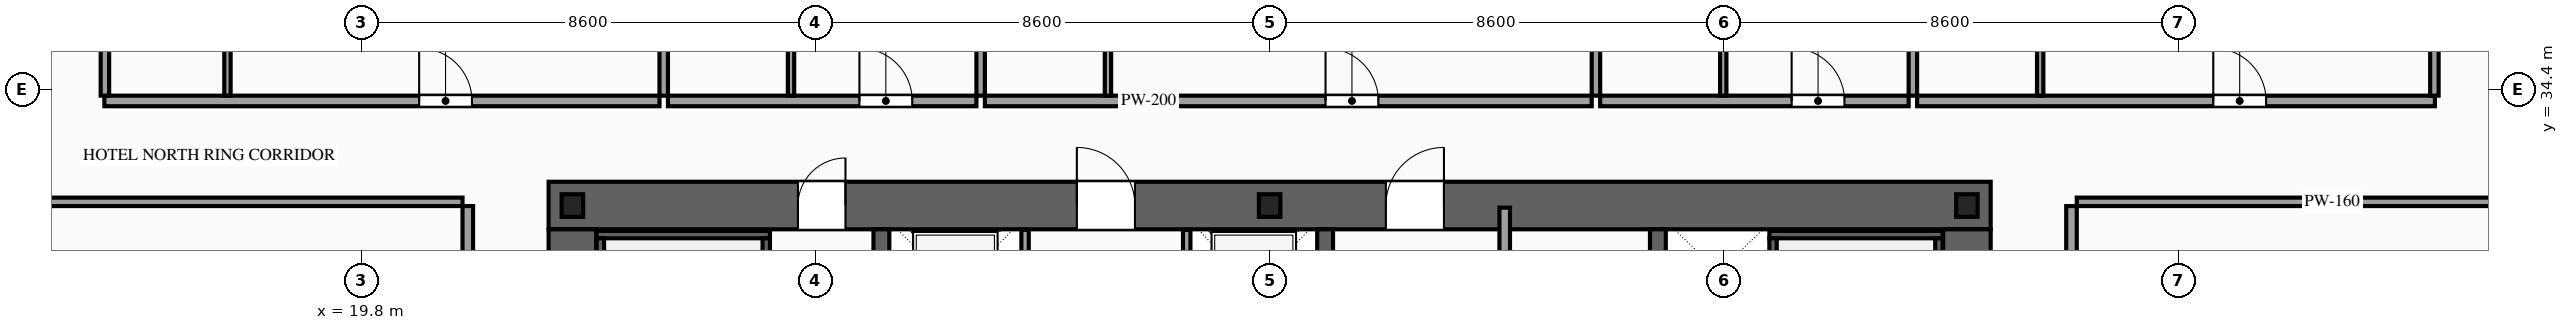
"""IFC4 building model, lengths in metres.
Left out: names, types, materials, properties, quantities, classifications, styles, units other than length and angle.
Written with IfcOpenShell. Run it as: python <this file> out.ifc"""

import sys

from ifc_helpers import new_model, si_unit, direction, frame, frame_2d, origin, origin_2d, place, context, subcontext, project, spatial, rectangle, i_section, extrude, source, transform, mapped, element, fill, save


model = new_model("IFC4")
c1 = context("Model", 3, precision=1e-05, world=origin(), true_north=direction((0.0, 1.0)))
c2 = subcontext(c1, "Body", "Model", "MODEL_VIEW")
j1 = project(units=[si_unit("LENGTHUNIT", "METRE"), si_unit("PLANEANGLEUNIT", "RADIAN")], contexts=[c1])
p1 = place(None, origin())
s1 = spatial("IfcSite", under=j1, at=p1, CompositionType="ELEMENT")
p2 = place(p1, origin())
s2 = spatial("IfcBuilding", under=s1, at=p2, CompositionType="ELEMENT")
p3 = place(p2, frame((0.0, 0.0, 78.4)))
s3 = spatial("IfcBuildingStorey", under=s2, at=p3, CompositionType="ELEMENT", Elevation=78.4)
p4 = place(p3, frame((23.35, 32.2, 0.0), z_axis=(0.0, 0.0, 1.0), x_axis=(1.0, 0.0, 0.0)))
e1 = element("IfcWall", 1, at=p4, inside=s3, PredefinedType="SHEAR", context=c2, shape_type="SweptSolid", body=[
    extrude(rectangle(XDim=27.3, YDim=0.9, at=frame_2d((13.65, 0.0))), origin(), (0.0, 0.0, 1.0), 3.6),
])
p5 = place(p4, frame((4.72, 0.0, 0.0)))
e2 = element("IfcOpeningElement", 2, at=p5, cuts=e1, PredefinedType="OPENING", context=c2, shape_type="SweptSolid", body=[
    extrude(rectangle(XDim=0.9, YDim=2.15, at=frame_2d((0.45, 1.075))), frame((0.0, 0.465, 0.0), z_axis=(0.0, -1.0, 0.0), x_axis=(1.0, 0.0, 0.0)), (0.0, 0.0, 1.0), 0.93),
])
p6 = place(p4, frame((10.0, 0.0, 0.0)))
e3 = element("IfcOpeningElement", 3, at=p6, cuts=e1, PredefinedType="OPENING", context=c2, shape_type="SweptSolid", body=[
    extrude(rectangle(XDim=1.1, YDim=2.2, at=frame_2d((0.55, 1.1))), frame((0.0, 0.465, 0.0), z_axis=(0.0, -1.0, 0.0), x_axis=(1.0, 0.0, 0.0)), (0.0, 0.0, 1.0), 0.93),
])
p7 = place(p4, frame((15.85, 0.0, 0.0)))
e4 = element("IfcOpeningElement", 4, at=p7, cuts=e1, PredefinedType="OPENING", context=c2, shape_type="SweptSolid", body=[
    extrude(rectangle(XDim=1.1, YDim=2.2, at=frame_2d((0.55, 1.1))), frame((0.0, 0.465, 0.0), z_axis=(0.0, -1.0, 0.0), x_axis=(1.0, 0.0, 0.0)), (0.0, 0.0, 1.0), 0.93),
])
m1 = source(origin(), c2, "Body", "SweptSolid", [
    extrude(rectangle(XDim=11.9, YDim=0.9, at=frame_2d((5.95, 0.0))), origin(), (0.0, 0.0, 1.0), 3.6),
])
for number, where, z_axis, x_axis in (
    (5, (23.8, 19.85, 0.0), (0.0, 0.0, 1.0), (0.0, 1.0, 0.0)),
    (6, (50.2, 19.85, 0.0), (0.0, 0.0, 1.0), (0.0, 1.0, 0.0)),
):
    element("IfcWall", number, at=place(p3, frame(where, z_axis=z_axis, x_axis=x_axis)), inside=s3, PredefinedType="SHEAR", context=c2, shape_type="MappedRepresentation", body=[
        mapped(m1, transform((0.0, 0.0, 0.0), scale=1.0)),
    ])
m2 = source(origin(), c2, "Body", "SweptSolid", [
    extrude(rectangle(XDim=11.9, YDim=0.3, at=frame_2d((5.95, 0.0))), origin(), (0.0, 0.0, 1.0), 3.6),
])
for number, where, z_axis, x_axis in (
    (7, (29.65, 19.85, 0.0), (0.0, 0.0, 1.0), (0.0, 1.0, 0.0)),
    (8, (38.05, 19.85, 0.0), (0.0, 0.0, 1.0), (0.0, 1.0, 0.0)),
    (9, (44.35, 19.85, 0.0), (0.0, 0.0, 1.0), (0.0, 1.0, 0.0)),
):
    element("IfcWall", number, at=place(p3, frame(where, z_axis=z_axis, x_axis=x_axis)), inside=s3, PredefinedType="SOLIDWALL", context=c2, shape_type="MappedRepresentation", body=[
        mapped(m2, transform((0.0, 0.0, 0.0), scale=1.0)),
    ])
m3 = source(origin(), c2, "Body", "SweptSolid", [
    extrude(i_section(OverallWidth=0.407, OverallDepth=0.428, WebThickness=0.02, FlangeThickness=0.035, at=origin_2d()), origin(), (0.0, 0.0, 1.0), 3.6),
])
for number, where, z_axis, x_axis in (
    (10, (23.8, 32.2, 0.0), (0.0, 0.0, 1.0), (1.0, 0.0, 0.0)),
    (11, (37.0, 32.2, 0.0), (0.0, 0.0, 1.0), (1.0, 0.0, 0.0)),
    (12, (50.2, 32.2, 0.0), (0.0, 0.0, 1.0), (1.0, 0.0, 0.0)),
):
    element("IfcColumn", number, at=place(p3, frame(where, z_axis=z_axis, x_axis=x_axis)), inside=s3, PredefinedType="COLUMN", context=c2, shape_type="MappedRepresentation", body=[
        mapped(m3, transform((0.0, 0.0, 0.0), scale=1.0)),
    ])
p8 = place(p3, frame((32.37, 29.4, 0.0), z_axis=(0.0, 0.0, 1.0), x_axis=(0.0, 1.0, 0.0)))
e13 = element("IfcWall", 13, at=p8, inside=s3, PredefinedType="SOLIDWALL", context=c2, shape_type="SweptSolid", body=[
    extrude(rectangle(XDim=2.34, YDim=0.14, at=frame_2d((1.17, 0.0))), origin(), (0.0, 0.0, 1.0), 3.38),
])
p9 = place(p8, frame((0.62, 0.0, 0.0)))
e14 = element("IfcOpeningElement", 14, at=p9, cuts=e13, PredefinedType="OPENING", context=c2, shape_type="SweptSolid", body=[
    extrude(rectangle(XDim=1.1, YDim=2.2, at=frame_2d((0.55, 1.1))), frame((0.0, 0.085, 0.0), z_axis=(0.0, -1.0, 0.0), x_axis=(1.0, 0.0, 0.0)), (0.0, 0.0, 1.0), 0.17),
])
p10 = place(p3, frame((35.43, 29.4, 0.0), z_axis=(0.0, 0.0, 1.0), x_axis=(0.0, 1.0, 0.0)))
e15 = element("IfcWall", 15, at=p10, inside=s3, PredefinedType="SOLIDWALL", context=c2, shape_type="SweptSolid", body=[
    extrude(rectangle(XDim=2.34, YDim=0.14, at=frame_2d((1.17, 0.0))), origin(), (0.0, 0.0, 1.0), 3.38),
])
p11 = place(p10, frame((0.62, 0.0, 0.0)))
e16 = element("IfcOpeningElement", 16, at=p11, cuts=e15, PredefinedType="OPENING", context=c2, shape_type="SweptSolid", body=[
    extrude(rectangle(XDim=1.1, YDim=2.2, at=frame_2d((0.55, 1.1))), frame((0.0, 0.085, 0.0), z_axis=(0.0, -1.0, 0.0), x_axis=(1.0, 0.0, 0.0)), (0.0, 0.0, 1.0), 0.17),
])
m4 = source(origin(), c2, "Body", "SweptSolid", [
    extrude(rectangle(XDim=3.28, YDim=0.14, at=frame_2d((1.64, 0.0))), origin(), (0.0, 0.0, 1.0), 3.38),
])
p12 = place(p3, frame((24.26, 31.65, 0.0), z_axis=(0.0, 0.0, 1.0), x_axis=(1.0, 0.0, 0.0)))
e17 = element("IfcWall", 17, at=p12, inside=s3, PredefinedType="SOLIDWALL", context=c2, shape_type="MappedRepresentation", body=[
    mapped(m4, transform((0.0, 0.0, 0.0), scale=1.0)),
])
m5 = source(origin(), c2, "Body", "SweptSolid", [
    extrude(rectangle(XDim=8.94, YDim=0.14, at=frame_2d((4.47, 0.0))), origin(), (0.0, 0.0, 1.0), 3.38),
])
for number, where, z_axis, x_axis in (
    (18, (24.33, 22.64, 0.0), (0.0, 0.0, 1.0), (0.0, 1.0, 0.0)),
    (19, (27.47, 22.64, 0.0), (0.0, 0.0, 1.0), (0.0, 1.0, 0.0)),
):
    element("IfcWall", number, at=place(p3, frame(where, z_axis=z_axis, x_axis=x_axis)), inside=s3, PredefinedType="SOLIDWALL", context=c2, shape_type="MappedRepresentation", body=[
        mapped(m5, transform((0.0, 0.0, 0.0), scale=1.0)),
    ])
p13 = place(p3, frame((46.46, 31.65, 0.0), z_axis=(0.0, 0.0, 1.0), x_axis=(1.0, 0.0, 0.0)))
e20 = element("IfcWall", 20, at=p13, inside=s3, PredefinedType="SOLIDWALL", context=c2, shape_type="MappedRepresentation", body=[
    mapped(m4, transform((0.0, 0.0, 0.0), scale=1.0)),
])
for number, where, z_axis, x_axis in (
    (21, (46.53, 22.64, 0.0), (0.0, 0.0, 1.0), (0.0, 1.0, 0.0)),
    (22, (49.67, 22.64, 0.0), (0.0, 0.0, 1.0), (0.0, 1.0, 0.0)),
):
    element("IfcWall", number, at=place(p3, frame(where, z_axis=z_axis, x_axis=x_axis)), inside=s3, PredefinedType="SOLIDWALL", context=c2, shape_type="MappedRepresentation", body=[
        mapped(m5, transform((0.0, 0.0, 0.0), scale=1.0)),
    ])
m6 = source(origin(), c2, "Body", "SweptSolid", [
    extrude(rectangle(XDim=12.72, YDim=0.2, at=frame_2d((6.36, 0.0))), origin(), (0.0, 0.0, 1.0), 3.38),
])
p14 = place(p3, frame((41.45, 19.44, 0.0), z_axis=(0.0, 0.0, 1.0), x_axis=(0.0, 1.0, 0.0)))
e23 = element("IfcWall", 23, at=p14, inside=s3, PredefinedType="PARTITIONING", context=c2, shape_type="MappedRepresentation", body=[
    mapped(m6, transform((0.0, 0.0, 0.0), scale=1.0)),
])
p15 = place(p3, frame((14.94, 34.18, 0.0), z_axis=(0.0, 0.0, 1.0), x_axis=(1.0, 0.0, 0.0)))
e24 = element("IfcWall", 24, at=p15, inside=s3, PredefinedType="PARTITIONING", context=c2, shape_type="SweptSolid", body=[
    extrude(rectangle(XDim=10.509, YDim=0.2, at=frame_2d((5.254, 0.0))), origin(), (0.0, 0.0, 1.0), 3.38),
])
p16 = place(p15, frame((5.959, 0.0, 0.0)))
e25 = element("IfcOpeningElement", 25, at=p16, cuts=e24, PredefinedType="OPENING", context=c2, shape_type="SweptSolid", body=[
    extrude(rectangle(XDim=1.0, YDim=2.2, at=frame_2d((0.5, 1.1))), frame((0.0, 0.115, 0.0), z_axis=(0.0, -1.0, 0.0), x_axis=(1.0, 0.0, 0.0)), (0.0, 0.0, 1.0), 0.23),
])
m7 = source(origin(), c2, "Body", "SweptSolid", [
    extrude(rectangle(XDim=16.47, YDim=0.16, at=frame_2d((8.235, 0.0))), origin(), (0.0, 0.0, 1.0), 3.38),
])
p17 = place(p3, frame((25.529, 34.28, 0.0), z_axis=(0.0, 0.0, 1.0), x_axis=(0.0, 1.0, 0.0)))
e26 = element("IfcWall", 26, at=p17, inside=s3, PredefinedType="PARTITIONING", context=c2, shape_type="MappedRepresentation", body=[
    mapped(m7, transform((0.0, 0.0, 0.0), scale=1.0)),
])
m8 = source(origin(), c2, "Body", "SweptSolid", [
    extrude(rectangle(XDim=2.42, YDim=0.12, at=frame_2d((1.21, 0.0))), origin(), (0.0, 0.0, 1.0), 3.38),
])
p18 = place(p3, frame((17.27, 34.28, 0.0), z_axis=(0.0, 0.0, 1.0), x_axis=(0.0, 1.0, 0.0)))
e27 = element("IfcWall", 27, at=p18, inside=s3, PredefinedType="PARTITIONING", context=c2, shape_type="MappedRepresentation", body=[
    mapped(m8, transform((0.0, 0.0, 0.0), scale=1.0)),
])
p19 = place(p3, frame((25.609, 34.18, 0.0), z_axis=(0.0, 0.0, 1.0), x_axis=(1.0, 0.0, 0.0)))
e28 = element("IfcWall", 28, at=p19, inside=s3, PredefinedType="PARTITIONING", context=c2, shape_type="SweptSolid", body=[
    extrude(rectangle(XDim=5.84, YDim=0.2, at=frame_2d((2.92, 0.0))), origin(), (0.0, 0.0, 1.0), 3.38),
])
p20 = place(p19, frame((3.625, 0.0, 0.0)))
e29 = element("IfcOpeningElement", 29, at=p20, cuts=e28, PredefinedType="OPENING", context=c2, shape_type="SweptSolid", body=[
    extrude(rectangle(XDim=1.0, YDim=2.2, at=frame_2d((0.5, 1.1))), frame((0.0, 0.115, 0.0), z_axis=(0.0, -1.0, 0.0), x_axis=(1.0, 0.0, 0.0)), (0.0, 0.0, 1.0), 0.23),
])
p21 = place(p3, frame((31.529, 34.28, 0.0), z_axis=(0.0, 0.0, 1.0), x_axis=(0.0, 1.0, 0.0)))
e30 = element("IfcWall", 30, at=p21, inside=s3, PredefinedType="PARTITIONING", context=c2, shape_type="MappedRepresentation", body=[
    mapped(m7, transform((0.0, 0.0, 0.0), scale=1.0)),
])
p22 = place(p3, frame((27.939, 34.28, 0.0), z_axis=(0.0, 0.0, 1.0), x_axis=(0.0, 1.0, 0.0)))
e31 = element("IfcWall", 31, at=p22, inside=s3, PredefinedType="PARTITIONING", context=c2, shape_type="MappedRepresentation", body=[
    mapped(m8, transform((0.0, 0.0, 0.0), scale=1.0)),
])
p23 = place(p3, frame((31.609, 34.18, 0.0), z_axis=(0.0, 0.0, 1.0), x_axis=(1.0, 0.0, 0.0)))
e32 = element("IfcWall", 32, at=p23, inside=s3, PredefinedType="PARTITIONING", context=c2, shape_type="SweptSolid", body=[
    extrude(rectangle(XDim=11.488, YDim=0.2, at=frame_2d((5.744, 0.0))), origin(), (0.0, 0.0, 1.0), 3.38),
])
p24 = place(p23, frame((6.449, 0.0, 0.0)))
e33 = element("IfcOpeningElement", 33, at=p24, cuts=e32, PredefinedType="OPENING", context=c2, shape_type="SweptSolid", body=[
    extrude(rectangle(XDim=1.0, YDim=2.2, at=frame_2d((0.5, 1.1))), frame((0.0, 0.115, 0.0), z_axis=(0.0, -1.0, 0.0), x_axis=(1.0, 0.0, 0.0)), (0.0, 0.0, 1.0), 0.23),
])
p25 = place(p3, frame((43.177, 34.28, 0.0), z_axis=(0.0, 0.0, 1.0), x_axis=(0.0, 1.0, 0.0)))
e34 = element("IfcWall", 34, at=p25, inside=s3, PredefinedType="PARTITIONING", context=c2, shape_type="MappedRepresentation", body=[
    mapped(m7, transform((0.0, 0.0, 0.0), scale=1.0)),
])
p26 = place(p3, frame((33.939, 34.28, 0.0), z_axis=(0.0, 0.0, 1.0), x_axis=(0.0, 1.0, 0.0)))
e35 = element("IfcWall", 35, at=p26, inside=s3, PredefinedType="PARTITIONING", context=c2, shape_type="MappedRepresentation", body=[
    mapped(m8, transform((0.0, 0.0, 0.0), scale=1.0)),
])
p27 = place(p3, frame((43.257, 34.18, 0.0), z_axis=(0.0, 0.0, 1.0), x_axis=(1.0, 0.0, 0.0)))
e36 = element("IfcWall", 36, at=p27, inside=s3, PredefinedType="PARTITIONING", context=c2, shape_type="SweptSolid", body=[
    extrude(rectangle(XDim=5.84, YDim=0.2, at=frame_2d((2.92, 0.0))), origin(), (0.0, 0.0, 1.0), 3.38),
])
p28 = place(p27, frame((3.625, 0.0, 0.0)))
e37 = element("IfcOpeningElement", 37, at=p28, cuts=e36, PredefinedType="OPENING", context=c2, shape_type="SweptSolid", body=[
    extrude(rectangle(XDim=1.0, YDim=2.2, at=frame_2d((0.5, 1.1))), frame((0.0, 0.115, 0.0), z_axis=(0.0, -1.0, 0.0), x_axis=(1.0, 0.0, 0.0)), (0.0, 0.0, 1.0), 0.23),
])
p29 = place(p3, frame((49.177, 34.28, 0.0), z_axis=(0.0, 0.0, 1.0), x_axis=(0.0, 1.0, 0.0)))
e38 = element("IfcWall", 38, at=p29, inside=s3, PredefinedType="PARTITIONING", context=c2, shape_type="MappedRepresentation", body=[
    mapped(m7, transform((0.0, 0.0, 0.0), scale=1.0)),
])
p30 = place(p3, frame((45.587, 34.28, 0.0), z_axis=(0.0, 0.0, 1.0), x_axis=(0.0, 1.0, 0.0)))
e39 = element("IfcWall", 39, at=p30, inside=s3, PredefinedType="PARTITIONING", context=c2, shape_type="MappedRepresentation", body=[
    mapped(m8, transform((0.0, 0.0, 0.0), scale=1.0)),
])
p31 = place(p3, frame((49.257, 34.18, 0.0), z_axis=(0.0, 0.0, 1.0), x_axis=(1.0, 0.0, 0.0)))
e40 = element("IfcWall", 40, at=p31, inside=s3, PredefinedType="PARTITIONING", context=c2, shape_type="SweptSolid", body=[
    extrude(rectangle(XDim=9.803, YDim=0.2, at=frame_2d((4.901, 0.0))), origin(), (0.0, 0.0, 1.0), 3.38),
])
p32 = place(p31, frame((5.607, 0.0, 0.0)))
e41 = element("IfcOpeningElement", 41, at=p32, cuts=e40, PredefinedType="OPENING", context=c2, shape_type="SweptSolid", body=[
    extrude(rectangle(XDim=1.0, YDim=2.2, at=frame_2d((0.5, 1.1))), frame((0.0, 0.115, 0.0), z_axis=(0.0, -1.0, 0.0), x_axis=(1.0, 0.0, 0.0)), (0.0, 0.0, 1.0), 0.23),
])
m9 = source(origin(), c2, "Body", "SweptSolid", [
    extrude(rectangle(XDim=16.32, YDim=0.16, at=frame_2d((8.16, 0.0))), origin(), (0.0, 0.0, 1.0), 3.38),
])
for number, where, z_axis, x_axis in (
    (42, (14.95, 34.28, 0.0), (0.0, 0.0, 1.0), (0.0, 1.0, 0.0)),
    (43, (59.05, 34.28, 0.0), (0.0, 0.0, 1.0), (0.0, 1.0, 0.0)),
):
    element("IfcWall", number, at=place(p3, frame(where, z_axis=z_axis, x_axis=x_axis)), inside=s3, PredefinedType="PARTITIONING", context=c2, shape_type="MappedRepresentation", body=[
        mapped(m9, transform((0.0, 0.0, 0.0), scale=1.0)),
    ])
p33 = place(p3, frame((51.587, 34.28, 0.0), z_axis=(0.0, 0.0, 1.0), x_axis=(0.0, 1.0, 0.0)))
e44 = element("IfcWall", 44, at=p33, inside=s3, PredefinedType="PARTITIONING", context=c2, shape_type="MappedRepresentation", body=[
    mapped(m8, transform((0.0, 0.0, 0.0), scale=1.0)),
])
p34 = place(p3, frame((21.82, 25.88, 0.0), z_axis=(0.0, 0.0, 1.0), x_axis=(0.0, 1.0, 0.0)))
e45 = element("IfcWall", 45, at=p34, inside=s3, PredefinedType="PARTITIONING", context=c2, shape_type="SweptSolid", body=[
    extrude(rectangle(XDim=6.31, YDim=0.2, at=frame_2d((3.155, 0.0))), origin(), (0.0, 0.0, 1.0), 3.38),
])
p35 = place(p34, frame((3.835, 0.0, 0.0)))
e46 = element("IfcOpeningElement", 46, at=p35, cuts=e45, PredefinedType="OPENING", context=c2, shape_type="SweptSolid", body=[
    extrude(rectangle(XDim=1.0, YDim=2.2, at=frame_2d((0.5, 1.1))), frame((0.0, 0.115, 0.0), z_axis=(0.0, -1.0, 0.0), x_axis=(1.0, 0.0, 0.0)), (0.0, 0.0, 1.0), 0.23),
])
m10 = source(origin(), c2, "Body", "SweptSolid", [
    extrude(rectangle(XDim=9.67, YDim=0.16, at=frame_2d((4.835, 0.0))), origin(), (0.0, 0.0, 1.0), 2.875),
])
p36 = place(p3, frame((12.05, 32.27, 0.0), z_axis=(0.0, 0.0, 1.0), x_axis=(1.0, 0.0, 0.0)))
e47 = element("IfcWall", 47, at=p36, inside=s3, PredefinedType="PARTITIONING", context=c2, shape_type="MappedRepresentation", body=[
    mapped(m10, transform((0.0, 0.0, 0.0), scale=1.0)),
])
p37 = place(p3, frame((52.18, 25.88, 0.0), z_axis=(0.0, 0.0, 1.0), x_axis=(0.0, 1.0, 0.0)))
e48 = element("IfcWall", 48, at=p37, inside=s3, PredefinedType="PARTITIONING", context=c2, shape_type="SweptSolid", body=[
    extrude(rectangle(XDim=6.31, YDim=0.2, at=frame_2d((3.155, 0.0))), origin(), (0.0, 0.0, 1.0), 3.38),
])
p38 = place(p37, frame((3.835, 0.0, 0.0)))
e49 = element("IfcOpeningElement", 49, at=p38, cuts=e48, PredefinedType="OPENING", context=c2, shape_type="SweptSolid", body=[
    extrude(rectangle(XDim=1.0, YDim=2.2, at=frame_2d((0.5, 1.1))), frame((0.0, 0.115, 0.0), z_axis=(0.0, -1.0, 0.0), x_axis=(1.0, 0.0, 0.0)), (0.0, 0.0, 1.0), 0.23),
])
p39 = place(p3, frame((52.28, 32.27, 0.0), z_axis=(0.0, 0.0, 1.0), x_axis=(1.0, 0.0, 0.0)))
e50 = element("IfcWall", 50, at=p39, inside=s3, PredefinedType="PARTITIONING", context=c2, shape_type="MappedRepresentation", body=[
    mapped(m10, transform((0.0, 0.0, 0.0), scale=1.0)),
])
m11 = source(origin(), c2, "Body", "SweptSolid", [
    extrude(rectangle(XDim=0.9, YDim=2.15, at=frame_2d((0.45, 1.075))), frame((0.0, 0.025, 0.0), z_axis=(0.0, -1.0, 0.0), x_axis=(1.0, 0.0, 0.0)), (0.0, 0.0, 1.0), 0.05),
])
p40 = place(p5, origin())
e51 = element("IfcDoor", 51, at=p40, inside=s3, OperationType="SINGLE_SWING_RIGHT", PredefinedType="DOOR", context=c2, shape_type="MappedRepresentation", body=[
    mapped(m11, transform((0.0, 0.0, 0.0), scale=1.0)),
])
fill(e2, e51)
m12 = source(origin(), c2, "Body", "SweptSolid", [
    extrude(rectangle(XDim=1.1, YDim=2.2, at=frame_2d((0.55, 1.1))), frame((0.0, 0.025, 0.0), z_axis=(0.0, -1.0, 0.0), x_axis=(1.0, 0.0, 0.0)), (0.0, 0.0, 1.0), 0.05),
])
p41 = place(p6, origin())
e52 = element("IfcDoor", 52, at=p41, inside=s3, OperationType="SINGLE_SWING_LEFT", PredefinedType="DOOR", context=c2, shape_type="MappedRepresentation", body=[
    mapped(m12, transform((0.0, 0.0, 0.0), scale=1.0)),
])
fill(e3, e52)
p42 = place(p7, origin())
e53 = element("IfcDoor", 53, at=p42, inside=s3, OperationType="SINGLE_SWING_RIGHT", PredefinedType="DOOR", context=c2, shape_type="MappedRepresentation", body=[
    mapped(m12, transform((0.0, 0.0, 0.0), scale=1.0)),
])
fill(e4, e53)
m13 = source(origin(), c2, "Body", "SweptSolid", [
    extrude(rectangle(XDim=1.0, YDim=2.2, at=frame_2d((0.5, 1.1))), frame((0.0, 0.025, 0.0), z_axis=(0.0, -1.0, 0.0), x_axis=(1.0, 0.0, 0.0)), (0.0, 0.0, 1.0), 0.05),
])
p43 = place(p16, origin())
e54 = element("IfcDoor", 54, at=p43, inside=s3, OperationType="SINGLE_SWING_LEFT", PredefinedType="DOOR", context=c2, shape_type="MappedRepresentation", body=[
    mapped(m13, transform((0.0, 0.0, 0.0), scale=1.0)),
])
fill(e25, e54)
p44 = place(p20, origin())
e55 = element("IfcDoor", 55, at=p44, inside=s3, OperationType="SINGLE_SWING_LEFT", PredefinedType="DOOR", context=c2, shape_type="MappedRepresentation", body=[
    mapped(m13, transform((0.0, 0.0, 0.0), scale=1.0)),
])
fill(e29, e55)
p45 = place(p24, origin())
e56 = element("IfcDoor", 56, at=p45, inside=s3, OperationType="SINGLE_SWING_LEFT", PredefinedType="DOOR", context=c2, shape_type="MappedRepresentation", body=[
    mapped(m13, transform((0.0, 0.0, 0.0), scale=1.0)),
])
fill(e33, e56)
p46 = place(p28, origin())
e57 = element("IfcDoor", 57, at=p46, inside=s3, OperationType="SINGLE_SWING_LEFT", PredefinedType="DOOR", context=c2, shape_type="MappedRepresentation", body=[
    mapped(m13, transform((0.0, 0.0, 0.0), scale=1.0)),
])
fill(e37, e57)
p47 = place(p32, origin())
e58 = element("IfcDoor", 58, at=p47, inside=s3, OperationType="SINGLE_SWING_LEFT", PredefinedType="DOOR", context=c2, shape_type="MappedRepresentation", body=[
    mapped(m13, transform((0.0, 0.0, 0.0), scale=1.0)),
])
fill(e41, e58)
save(model, sys.argv[1])
